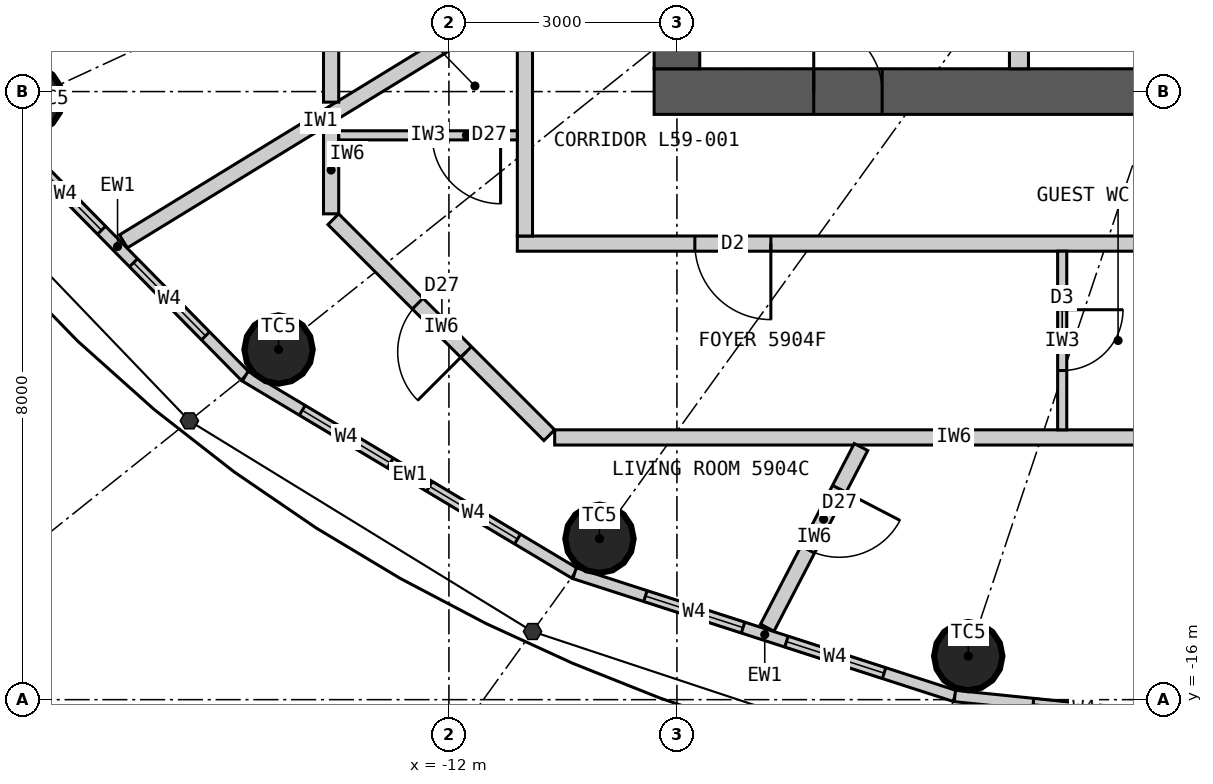
"""IFC4 building model, lengths in metres.
Left out: names, types, materials, properties, quantities, classifications, styles, units other than length and angle.
Written with IfcOpenShell. Run it as: python <this file> out.ifc"""

import sys

from ifc_helpers import new_model, si_unit, direction, frame, frame_2d, origin, origin_2d, place, context, subcontext, project, spatial, rectangle, circle, extrude, element, fill, save


model = new_model("IFC4")
c1 = context("Model", 3, precision=1e-05, world=origin(), true_north=direction((0.0, 1.0)))
c2 = subcontext(c1, "Body", "Model", "MODEL_VIEW")
j1 = project(units=[si_unit("LENGTHUNIT", "METRE"), si_unit("PLANEANGLEUNIT", "RADIAN")], contexts=[c1])
p1 = place(None, origin())
s1 = spatial("IfcSite", under=j1, at=p1, CompositionType="ELEMENT")
p2 = place(p1, origin())
s2 = spatial("IfcBuilding", under=s1, at=p2, CompositionType="ELEMENT")
p3 = place(p2, frame((0.0, 0.0, 219.3)))
s3 = spatial("IfcBuildingStorey", under=s2, at=p3, CompositionType="ELEMENT", Elevation=219.3)
for number, where, z_axis, x_axis in (
    (1, (-17.532, -8.098, 0.0), (0.0, 0.0, 1.0), (1.0, 0.0, 0.0)),
    (2, (-14.241, -11.393, 0.0), (0.0, 0.0, 1.0), (1.0, 0.0, 0.0)),
    (3, (-10.019, -13.883, 0.0), (0.0, 0.0, 1.0), (1.0, 0.0, 0.0)),
    (4, (-5.167, -15.427, 0.0), (0.0, 0.0, 1.0), (1.0, 0.0, 0.0)),
):
    element("IfcColumn", number, at=place(p3, frame(where, z_axis=z_axis, x_axis=x_axis)), inside=s3, PredefinedType="COLUMN", context=c2, shape_type="SweptSolid", body=[
        extrude(circle(Radius=0.45, at=origin_2d()), origin(), (0.0, 0.0, 1.0), 3.3),
    ])
p4 = place(p3, frame((9.3, -8.0, 0.0), z_axis=(0.0, 0.0, 1.0), x_axis=(-1.0, 0.0, 0.0)))
e5 = element("IfcWall", 5, at=p4, inside=s3, PredefinedType="SHEAR", context=c2, shape_type="SweptSolid", body=[
    extrude(rectangle(XDim=18.6, YDim=0.6, at=frame_2d((9.3, 0.0))), origin(), (0.0, 0.0, 1.0), 3.3),
])
p5 = place(p4, frame((8.0, 0.0, 0.0)))
e6 = element("IfcOpeningElement", 6, at=p5, cuts=e5, PredefinedType="OPENING", context=c2, shape_type="SweptSolid", body=[
    extrude(rectangle(XDim=1.2, YDim=2.2, at=frame_2d((0.6, 1.1))), frame((0.0, 0.31, 0.0), z_axis=(0.0, -1.0, 0.0), x_axis=(1.0, 0.0, 0.0)), (0.0, 0.0, 1.0), 0.62),
])
p6 = place(p4, frame((15.6, 0.0, 0.0)))
e7 = element("IfcOpeningElement", 7, at=p6, cuts=e5, PredefinedType="OPENING", context=c2, shape_type="SweptSolid", body=[
    extrude(rectangle(XDim=0.9, YDim=2.2, at=frame_2d((0.45, 1.1))), frame((0.0, 0.31, 0.0), z_axis=(0.0, -1.0, 0.0), x_axis=(1.0, 0.0, 0.0)), (0.0, 0.0, 1.0), 0.62),
])
p7 = place(p3, frame((-9.0, 7.7, 0.0), z_axis=(0.0, 0.0, 1.0), x_axis=(0.0, -1.0, 0.0)))
e8 = element("IfcWall", 8, at=p7, inside=s3, PredefinedType="SHEAR", context=c2, shape_type="SweptSolid", body=[
    extrude(rectangle(XDim=15.4, YDim=0.6, at=frame_2d((7.7, 0.0))), origin(), (0.0, 0.0, 1.0), 3.3),
])
p8 = place(p7, frame((6.8, 0.0, 0.0)))
e9 = element("IfcOpeningElement", 9, at=p8, cuts=e8, PredefinedType="OPENING", context=c2, shape_type="SweptSolid", body=[
    extrude(rectangle(XDim=1.8, YDim=2.2, at=frame_2d((0.9, 1.1))), frame((0.0, 0.31, 0.0), z_axis=(0.0, -1.0, 0.0), x_axis=(1.0, 0.0, 0.0)), (0.0, 0.0, 1.0), 0.62),
])
p9 = place(p3, frame((-4.5, -7.7, 0.0), z_axis=(0.0, 0.0, 1.0), x_axis=(0.0, 1.0, 0.0)))
e10 = element("IfcWall", 10, at=p9, inside=s3, PredefinedType="PARTITIONING", context=c2, shape_type="SweptSolid", body=[
    extrude(rectangle(XDim=3.2, YDim=0.25, at=frame_2d((1.6, 0.0))), origin(), (0.0, 0.0, 1.0), 3.3),
])
p10 = place(p3, frame((-18.04, -8.332, 0.0), z_axis=(0.0, 0.0, 1.0), x_axis=(0.701527379618, -0.712642501993, 0.0)))
e11 = element("IfcWall", 11, at=p10, inside=s3, PredefinedType="ELEMENTEDWALL", context=c2, shape_type="SweptSolid", body=[
    extrude(rectangle(XDim=4.788, YDim=0.15, at=frame_2d((2.394, 0.0))), origin(), (0.0, 0.0, 1.0), 3.12),
])
p11 = place(p10, frame((0.744, 0.0, 0.9)))
e12 = element("IfcOpeningElement", 12, at=p11, cuts=e11, PredefinedType="OPENING", context=c2, shape_type="SweptSolid", body=[
    extrude(rectangle(XDim=1.35, YDim=1.9, at=frame_2d((0.675, 0.95))), frame((0.0, 0.085, 0.0), z_axis=(0.0, -1.0, 0.0), x_axis=(1.0, 0.0, 0.0)), (0.0, 0.0, 1.0), 0.17),
])
p12 = place(p10, frame((2.694, 0.0, 0.9)))
e13 = element("IfcOpeningElement", 13, at=p12, cuts=e11, PredefinedType="OPENING", context=c2, shape_type="SweptSolid", body=[
    extrude(rectangle(XDim=1.35, YDim=1.9, at=frame_2d((0.675, 0.95))), frame((0.0, 0.085, 0.0), z_axis=(0.0, -1.0, 0.0), x_axis=(1.0, 0.0, 0.0)), (0.0, 0.0, 1.0), 0.17),
])
p13 = place(p3, frame((-14.68, -11.744, 0.0), z_axis=(0.0, 0.0, 1.0), x_axis=(0.85822150553, -0.513279502265, 0.0)))
e14 = element("IfcWall", 14, at=p13, inside=s3, PredefinedType="ELEMENTEDWALL", context=c2, shape_type="SweptSolid", body=[
    extrude(rectangle(XDim=5.05, YDim=0.15, at=frame_2d((2.525, 0.0))), origin(), (0.0, 0.0, 1.0), 3.12),
])
p14 = place(p13, frame((0.875, 0.0, 0.9)))
e15 = element("IfcOpeningElement", 15, at=p14, cuts=e14, PredefinedType="OPENING", context=c2, shape_type="SweptSolid", body=[
    extrude(rectangle(XDim=1.35, YDim=1.9, at=frame_2d((0.675, 0.95))), frame((0.0, 0.085, 0.0), z_axis=(0.0, -1.0, 0.0), x_axis=(1.0, 0.0, 0.0)), (0.0, 0.0, 1.0), 0.17),
])
p15 = place(p13, frame((2.825, 0.0, 0.9)))
e16 = element("IfcOpeningElement", 16, at=p15, cuts=e14, PredefinedType="OPENING", context=c2, shape_type="SweptSolid", body=[
    extrude(rectangle(XDim=1.35, YDim=1.9, at=frame_2d((0.675, 0.95))), frame((0.0, 0.085, 0.0), z_axis=(0.0, -1.0, 0.0), x_axis=(1.0, 0.0, 0.0)), (0.0, 0.0, 1.0), 0.17),
])
p16 = place(p3, frame((-10.346, -14.336, 0.0), z_axis=(0.0, 0.0, 1.0), x_axis=(0.951644702515, -0.307200846638, 0.0)))
e17 = element("IfcWall", 17, at=p16, inside=s3, PredefinedType="ELEMENTEDWALL", context=c2, shape_type="SweptSolid", body=[
    extrude(rectangle(XDim=5.258, YDim=0.15, at=frame_2d((2.629, 0.0))), origin(), (0.0, 0.0, 1.0), 3.12),
])
p17 = place(p16, frame((0.979, 0.0, 0.9)))
e18 = element("IfcOpeningElement", 18, at=p17, cuts=e17, PredefinedType="OPENING", context=c2, shape_type="SweptSolid", body=[
    extrude(rectangle(XDim=1.35, YDim=1.9, at=frame_2d((0.675, 0.95))), frame((0.0, 0.085, 0.0), z_axis=(0.0, -1.0, 0.0), x_axis=(1.0, 0.0, 0.0)), (0.0, 0.0, 1.0), 0.17),
])
p18 = place(p16, frame((2.929, 0.0, 0.9)))
e19 = element("IfcOpeningElement", 19, at=p18, cuts=e17, PredefinedType="OPENING", context=c2, shape_type="SweptSolid", body=[
    extrude(rectangle(XDim=1.35, YDim=1.9, at=frame_2d((0.675, 0.95))), frame((0.0, 0.085, 0.0), z_axis=(0.0, -1.0, 0.0), x_axis=(1.0, 0.0, 0.0)), (0.0, 0.0, 1.0), 0.17),
])
p19 = place(p3, frame((-5.343, -15.952, 0.0), z_axis=(0.0, 0.0, 1.0), x_axis=(0.994774574972, -0.102095763818, 0.0)))
e20 = element("IfcWall", 20, at=p19, inside=s3, PredefinedType="ELEMENTEDWALL", context=c2, shape_type="SweptSolid", body=[
    extrude(rectangle(XDim=5.371, YDim=0.15, at=frame_2d((2.686, 0.0))), origin(), (0.0, 0.0, 1.0), 3.12),
])
p20 = place(p19, frame((1.035, 0.0, 0.9)))
e21 = element("IfcOpeningElement", 21, at=p20, cuts=e20, PredefinedType="OPENING", context=c2, shape_type="SweptSolid", body=[
    extrude(rectangle(XDim=1.35, YDim=1.9, at=frame_2d((0.675, 0.95))), frame((0.0, 0.085, 0.0), z_axis=(0.0, -1.0, 0.0), x_axis=(1.0, 0.0, 0.0)), (0.0, 0.0, 1.0), 0.17),
])
p21 = place(p19, frame((2.985, 0.0, 0.9)))
e22 = element("IfcOpeningElement", 22, at=p21, cuts=e20, PredefinedType="OPENING", context=c2, shape_type="SweptSolid", body=[
    extrude(rectangle(XDim=1.35, YDim=1.9, at=frame_2d((0.675, 0.95))), frame((0.0, 0.085, 0.0), z_axis=(0.0, -1.0, 0.0), x_axis=(1.0, 0.0, 0.0)), (0.0, 0.0, 1.0), 0.17),
])
p22 = place(p3, frame((11.1, -10.0, 0.0), z_axis=(0.0, 0.0, 1.0), x_axis=(-1.0, 0.0, 0.0)))
e23 = element("IfcWall", 23, at=p22, inside=s3, PredefinedType="PARTITIONING", context=c2, shape_type="SweptSolid", body=[
    extrude(rectangle(XDim=22.2, YDim=0.2, at=frame_2d((11.1, 0.0))), origin(), (0.0, 0.0, 1.0), 3.12),
])
p23 = place(p22, frame((18.864, 0.0, 0.0)))
e24 = element("IfcOpeningElement", 24, at=p23, cuts=e23, PredefinedType="OPENING", context=c2, shape_type="SweptSolid", body=[
    extrude(rectangle(XDim=1.0, YDim=2.2, at=frame_2d((0.5, 1.1))), frame((0.0, 0.11, 0.0), z_axis=(0.0, -1.0, 0.0), x_axis=(1.0, 0.0, 0.0)), (0.0, 0.0, 1.0), 0.22),
])
p24 = place(p22, frame((2.309, 0.0, 0.0)))
e25 = element("IfcOpeningElement", 25, at=p24, cuts=e23, PredefinedType="OPENING", context=c2, shape_type="SweptSolid", body=[
    extrude(rectangle(XDim=1.0, YDim=2.2, at=frame_2d((0.5, 1.1))), frame((0.0, 0.11, 0.0), z_axis=(0.0, -1.0, 0.0), x_axis=(1.0, 0.0, 0.0)), (0.0, 0.0, 1.0), 0.22),
])
p25 = place(p3, frame((-11.0, -2.234, 0.0), z_axis=(0.0, 0.0, 1.0), x_axis=(0.0, -1.0, 0.0)))
e26 = element("IfcWall", 26, at=p25, inside=s3, PredefinedType="PARTITIONING", context=c2, shape_type="SweptSolid", body=[
    extrude(rectangle(XDim=7.666, YDim=0.2, at=frame_2d((3.833, 0.0))), origin(), (0.0, 0.0, 1.0), 3.12),
])
p26 = place(p3, frame((-11.1, -6.797, 0.0), z_axis=(0.0, 0.0, 1.0), x_axis=(-0.852799818179, -0.522237943963, 0.0)))
e27 = element("IfcWall", 27, at=p26, inside=s3, PredefinedType="PARTITIONING", context=c2, shape_type="SweptSolid", body=[
    extrude(rectangle(XDim=6.077, YDim=0.2, at=frame_2d((3.039, 0.0))), origin(), (0.0, 0.0, 1.0), 3.12),
])
p27 = place(p3, frame((-13.55, 4.357, 0.0), z_axis=(0.0, 0.0, 1.0), x_axis=(0.0, -1.0, 0.0)))
e28 = element("IfcWall", 28, at=p27, inside=s3, PredefinedType="PARTITIONING", context=c2, shape_type="SweptSolid", body=[
    extrude(rectangle(XDim=12.496, YDim=0.2, at=frame_2d((6.248, 0.0))), origin(), (0.0, 0.0, 1.0), 3.12),
])
p28 = place(p27, frame((1.92, 0.0, 0.0)))
e29 = element("IfcOpeningElement", 29, at=p28, cuts=e28, PredefinedType="OPENING", context=c2, shape_type="SweptSolid", body=[
    extrude(rectangle(XDim=0.8, YDim=2.1, at=frame_2d((0.4, 1.05))), frame((0.0, 0.11, 0.0), z_axis=(0.0, -1.0, 0.0), x_axis=(1.0, 0.0, 0.0)), (0.0, 0.0, 1.0), 0.22),
])
p29 = place(p27, frame((9.27, 0.0, 0.0)))
e30 = element("IfcOpeningElement", 30, at=p29, cuts=e28, PredefinedType="OPENING", context=c2, shape_type="SweptSolid", body=[
    extrude(rectangle(XDim=0.8, YDim=2.1, at=frame_2d((0.4, 1.05))), frame((0.0, 0.11, 0.0), z_axis=(0.0, -1.0, 0.0), x_axis=(1.0, 0.0, 0.0)), (0.0, 0.0, 1.0), 0.22),
])
p30 = place(p27, frame((5.557, 0.0, 0.0)))
e31 = element("IfcOpeningElement", 31, at=p30, cuts=e28, PredefinedType="OPENING", context=c2, shape_type="SweptSolid", body=[
    extrude(rectangle(XDim=0.9, YDim=2.1, at=frame_2d((0.45, 1.05))), frame((0.0, 0.11, 0.0), z_axis=(0.0, -1.0, 0.0), x_axis=(1.0, 0.0, 0.0)), (0.0, 0.0, 1.0), 0.22),
])
p31 = place(p3, frame((-13.55, -8.456, 0.0), z_axis=(0.0, 0.0, 1.0), x_axis=(0.0, -1.0, 0.0)))
e32 = element("IfcWall", 32, at=p31, inside=s3, PredefinedType="PARTITIONING", context=c2, shape_type="SweptSolid", body=[
    extrude(rectangle(XDim=1.153, YDim=0.2, at=frame_2d((0.576, 0.0))), origin(), (0.0, 0.0, 1.0), 3.12),
])
p32 = place(p3, frame((-13.521, -9.679, 0.0), z_axis=(0.0, 0.0, 1.0), x_axis=(0.707106781187, -0.707106781187, 0.0)))
e33 = element("IfcWall", 33, at=p32, inside=s3, PredefinedType="PARTITIONING", context=c2, shape_type="SweptSolid", body=[
    extrude(rectangle(XDim=4.019, YDim=0.2, at=frame_2d((2.009, 0.0))), origin(), (0.0, 0.0, 1.0), 3.12),
])
p33 = place(p32, frame((1.57, 0.0, 0.0)))
e34 = element("IfcOpeningElement", 34, at=p33, cuts=e33, PredefinedType="OPENING", context=c2, shape_type="SweptSolid", body=[
    extrude(rectangle(XDim=0.9, YDim=2.1, at=frame_2d((0.45, 1.05))), frame((0.0, 0.11, 0.0), z_axis=(0.0, -1.0, 0.0), x_axis=(1.0, 0.0, 0.0)), (0.0, 0.0, 1.0), 0.22),
])
p34 = place(p3, frame((-10.609, -12.55, 0.0), z_axis=(0.0, 0.0, 1.0), x_axis=(1.0, 0.0, 0.0)))
e35 = element("IfcWall", 35, at=p34, inside=s3, PredefinedType="PARTITIONING", context=c2, shape_type="SweptSolid", body=[
    extrude(rectangle(XDim=10.508, YDim=0.2, at=frame_2d((5.254, 0.0))), origin(), (0.0, 0.0, 1.0), 3.12),
])
p35 = place(p34, frame((8.308, 0.0, 0.0)))
e36 = element("IfcOpeningElement", 36, at=p35, cuts=e35, PredefinedType="OPENING", context=c2, shape_type="SweptSolid", body=[
    extrude(rectangle(XDim=0.8, YDim=2.1, at=frame_2d((0.4, 1.05))), frame((0.0, 0.11, 0.0), z_axis=(0.0, -1.0, 0.0), x_axis=(1.0, 0.0, 0.0)), (0.0, 0.0, 1.0), 0.22),
])
p36 = place(p3, frame((-6.578, -12.677, 0.0), z_axis=(0.0, 0.0, 1.0), x_axis=(-0.460620531465, -0.887597164255, 0.0)))
e37 = element("IfcWall", 37, at=p36, inside=s3, PredefinedType="PARTITIONING", context=c2, shape_type="SweptSolid", body=[
    extrude(rectangle(XDim=2.678, YDim=0.2, at=frame_2d((1.339, 0.0))), origin(), (0.0, 0.0, 1.0), 3.12),
])
p37 = place(p36, frame((0.62, 0.0, 0.0)))
e38 = element("IfcOpeningElement", 38, at=p37, cuts=e37, PredefinedType="OPENING", context=c2, shape_type="SweptSolid", body=[
    extrude(rectangle(XDim=0.9, YDim=2.1, at=frame_2d((0.45, 1.05))), frame((0.0, 0.11, 0.0), z_axis=(0.0, -1.0, 0.0), x_axis=(1.0, 0.0, 0.0)), (0.0, 0.0, 1.0), 0.22),
])
p38 = place(p3, frame((-11.1, -8.576, 0.0), z_axis=(0.0, 0.0, 1.0), x_axis=(-1.0, 0.0, 0.0)))
e39 = element("IfcWall", 39, at=p38, inside=s3, PredefinedType="PARTITIONING", context=c2, shape_type="SweptSolid", body=[
    extrude(rectangle(XDim=2.35, YDim=0.12, at=frame_2d((1.175, 0.0))), origin(), (0.0, 0.0, 1.0), 3.12),
])
p39 = place(p38, frame((0.22, 0.0, 0.0)))
e40 = element("IfcOpeningElement", 40, at=p39, cuts=e39, PredefinedType="OPENING", context=c2, shape_type="SweptSolid", body=[
    extrude(rectangle(XDim=0.9, YDim=2.1, at=frame_2d((0.45, 1.05))), frame((0.0, 0.07, 0.0), z_axis=(0.0, -1.0, 0.0), x_axis=(1.0, 0.0, 0.0)), (0.0, 0.0, 1.0), 0.14),
])
p40 = place(p3, frame((-3.931, -10.1, 0.0), z_axis=(0.0, 0.0, 1.0), x_axis=(0.0, -1.0, 0.0)))
e41 = element("IfcWall", 41, at=p40, inside=s3, PredefinedType="PARTITIONING", context=c2, shape_type="SweptSolid", body=[
    extrude(rectangle(XDim=2.35, YDim=0.12, at=frame_2d((1.175, 0.0))), origin(), (0.0, 0.0, 1.0), 3.12),
])
p41 = place(p40, frame((0.77, 0.0, 0.0)))
e42 = element("IfcOpeningElement", 42, at=p41, cuts=e41, PredefinedType="OPENING", context=c2, shape_type="SweptSolid", body=[
    extrude(rectangle(XDim=0.8, YDim=2.1, at=frame_2d((0.4, 1.05))), frame((0.0, 0.07, 0.0), z_axis=(0.0, -1.0, 0.0), x_axis=(1.0, 0.0, 0.0)), (0.0, 0.0, 1.0), 0.14),
])
p42 = place(p11, origin())
e43 = element("IfcWindow", 43, at=p42, inside=s3, PartitioningType="SINGLE_PANEL", PredefinedType="WINDOW", context=c2, shape_type="SweptSolid", body=[
    extrude(rectangle(XDim=1.35, YDim=1.9, at=frame_2d((0.675, 0.95))), frame((0.0, 0.03, 0.0), z_axis=(0.0, -1.0, 0.0), x_axis=(1.0, 0.0, 0.0)), (0.0, 0.0, 1.0), 0.06),
])
fill(e12, e43)
p43 = place(p12, origin())
e44 = element("IfcWindow", 44, at=p43, inside=s3, PartitioningType="SINGLE_PANEL", PredefinedType="WINDOW", context=c2, shape_type="SweptSolid", body=[
    extrude(rectangle(XDim=1.35, YDim=1.9, at=frame_2d((0.675, 0.95))), frame((0.0, 0.03, 0.0), z_axis=(0.0, -1.0, 0.0), x_axis=(1.0, 0.0, 0.0)), (0.0, 0.0, 1.0), 0.06),
])
fill(e13, e44)
p44 = place(p14, origin())
e45 = element("IfcWindow", 45, at=p44, inside=s3, PartitioningType="SINGLE_PANEL", PredefinedType="WINDOW", context=c2, shape_type="SweptSolid", body=[
    extrude(rectangle(XDim=1.35, YDim=1.9, at=frame_2d((0.675, 0.95))), frame((0.0, 0.03, 0.0), z_axis=(0.0, -1.0, 0.0), x_axis=(1.0, 0.0, 0.0)), (0.0, 0.0, 1.0), 0.06),
])
fill(e15, e45)
p45 = place(p15, origin())
e46 = element("IfcWindow", 46, at=p45, inside=s3, PartitioningType="SINGLE_PANEL", PredefinedType="WINDOW", context=c2, shape_type="SweptSolid", body=[
    extrude(rectangle(XDim=1.35, YDim=1.9, at=frame_2d((0.675, 0.95))), frame((0.0, 0.03, 0.0), z_axis=(0.0, -1.0, 0.0), x_axis=(1.0, 0.0, 0.0)), (0.0, 0.0, 1.0), 0.06),
])
fill(e16, e46)
p46 = place(p17, origin())
e47 = element("IfcWindow", 47, at=p46, inside=s3, PartitioningType="SINGLE_PANEL", PredefinedType="WINDOW", context=c2, shape_type="SweptSolid", body=[
    extrude(rectangle(XDim=1.35, YDim=1.9, at=frame_2d((0.675, 0.95))), frame((0.0, 0.03, 0.0), z_axis=(0.0, -1.0, 0.0), x_axis=(1.0, 0.0, 0.0)), (0.0, 0.0, 1.0), 0.06),
])
fill(e18, e47)
p47 = place(p18, origin())
e48 = element("IfcWindow", 48, at=p47, inside=s3, PartitioningType="SINGLE_PANEL", PredefinedType="WINDOW", context=c2, shape_type="SweptSolid", body=[
    extrude(rectangle(XDim=1.35, YDim=1.9, at=frame_2d((0.675, 0.95))), frame((0.0, 0.03, 0.0), z_axis=(0.0, -1.0, 0.0), x_axis=(1.0, 0.0, 0.0)), (0.0, 0.0, 1.0), 0.06),
])
fill(e19, e48)
p48 = place(p20, origin())
e49 = element("IfcWindow", 49, at=p48, inside=s3, PartitioningType="SINGLE_PANEL", PredefinedType="WINDOW", context=c2, shape_type="SweptSolid", body=[
    extrude(rectangle(XDim=1.35, YDim=1.9, at=frame_2d((0.675, 0.95))), frame((0.0, 0.03, 0.0), z_axis=(0.0, -1.0, 0.0), x_axis=(1.0, 0.0, 0.0)), (0.0, 0.0, 1.0), 0.06),
])
fill(e21, e49)
p49 = place(p23, origin())
e50 = element("IfcDoor", 50, at=p49, inside=s3, OperationType="SINGLE_SWING_LEFT", PredefinedType="DOOR", context=c2, shape_type="SweptSolid", body=[
    extrude(rectangle(XDim=1.0, YDim=2.2, at=frame_2d((0.5, 1.1))), frame((0.0, 0.025, 0.0), z_axis=(0.0, -1.0, 0.0), x_axis=(1.0, 0.0, 0.0)), (0.0, 0.0, 1.0), 0.05),
])
fill(e24, e50)
p50 = place(p39, origin())
e51 = element("IfcDoor", 51, at=p50, inside=s3, OperationType="SINGLE_SWING_LEFT", PredefinedType="DOOR", context=c2, shape_type="SweptSolid", body=[
    extrude(rectangle(XDim=0.9, YDim=2.1, at=frame_2d((0.45, 1.05))), frame((0.0, 0.025, 0.0), z_axis=(0.0, -1.0, 0.0), x_axis=(1.0, 0.0, 0.0)), (0.0, 0.0, 1.0), 0.05),
])
fill(e40, e51)
p51 = place(p41, origin())
e52 = element("IfcDoor", 52, at=p51, inside=s3, OperationType="SINGLE_SWING_LEFT", PredefinedType="DOOR", context=c2, shape_type="SweptSolid", body=[
    extrude(rectangle(XDim=0.8, YDim=2.1, at=frame_2d((0.4, 1.05))), frame((0.0, 0.025, 0.0), z_axis=(0.0, -1.0, 0.0), x_axis=(1.0, 0.0, 0.0)), (0.0, 0.0, 1.0), 0.05),
])
fill(e42, e52)
p52 = place(p33, origin())
e53 = element("IfcDoor", 53, at=p52, inside=s3, OperationType="SINGLE_SWING_RIGHT", PredefinedType="DOOR", context=c2, shape_type="SweptSolid", body=[
    extrude(rectangle(XDim=0.9, YDim=2.1, at=frame_2d((0.45, 1.05))), frame((0.0, 0.025, 0.0), z_axis=(0.0, -1.0, 0.0), x_axis=(1.0, 0.0, 0.0)), (0.0, 0.0, 1.0), 0.05),
])
fill(e34, e53)
p53 = place(p37, origin())
e54 = element("IfcDoor", 54, at=p53, inside=s3, OperationType="SINGLE_SWING_LEFT", PredefinedType="DOOR", context=c2, shape_type="SweptSolid", body=[
    extrude(rectangle(XDim=0.9, YDim=2.1, at=frame_2d((0.45, 1.05))), frame((0.0, 0.025, 0.0), z_axis=(0.0, -1.0, 0.0), x_axis=(1.0, 0.0, 0.0)), (0.0, 0.0, 1.0), 0.05),
])
fill(e38, e54)
p54 = place(p6, origin())
e55 = element("IfcDoor", 55, at=p54, inside=s3, OperationType="SINGLE_SWING_RIGHT", PredefinedType="DOOR", context=c2, shape_type="SweptSolid", body=[
    extrude(rectangle(XDim=0.9, YDim=2.2, at=frame_2d((0.45, 1.1))), frame((0.0, 0.025, 0.0), z_axis=(0.0, -1.0, 0.0), x_axis=(1.0, 0.0, 0.0)), (0.0, 0.0, 1.0), 0.05),
])
fill(e7, e55)
save(model, sys.argv[1])
